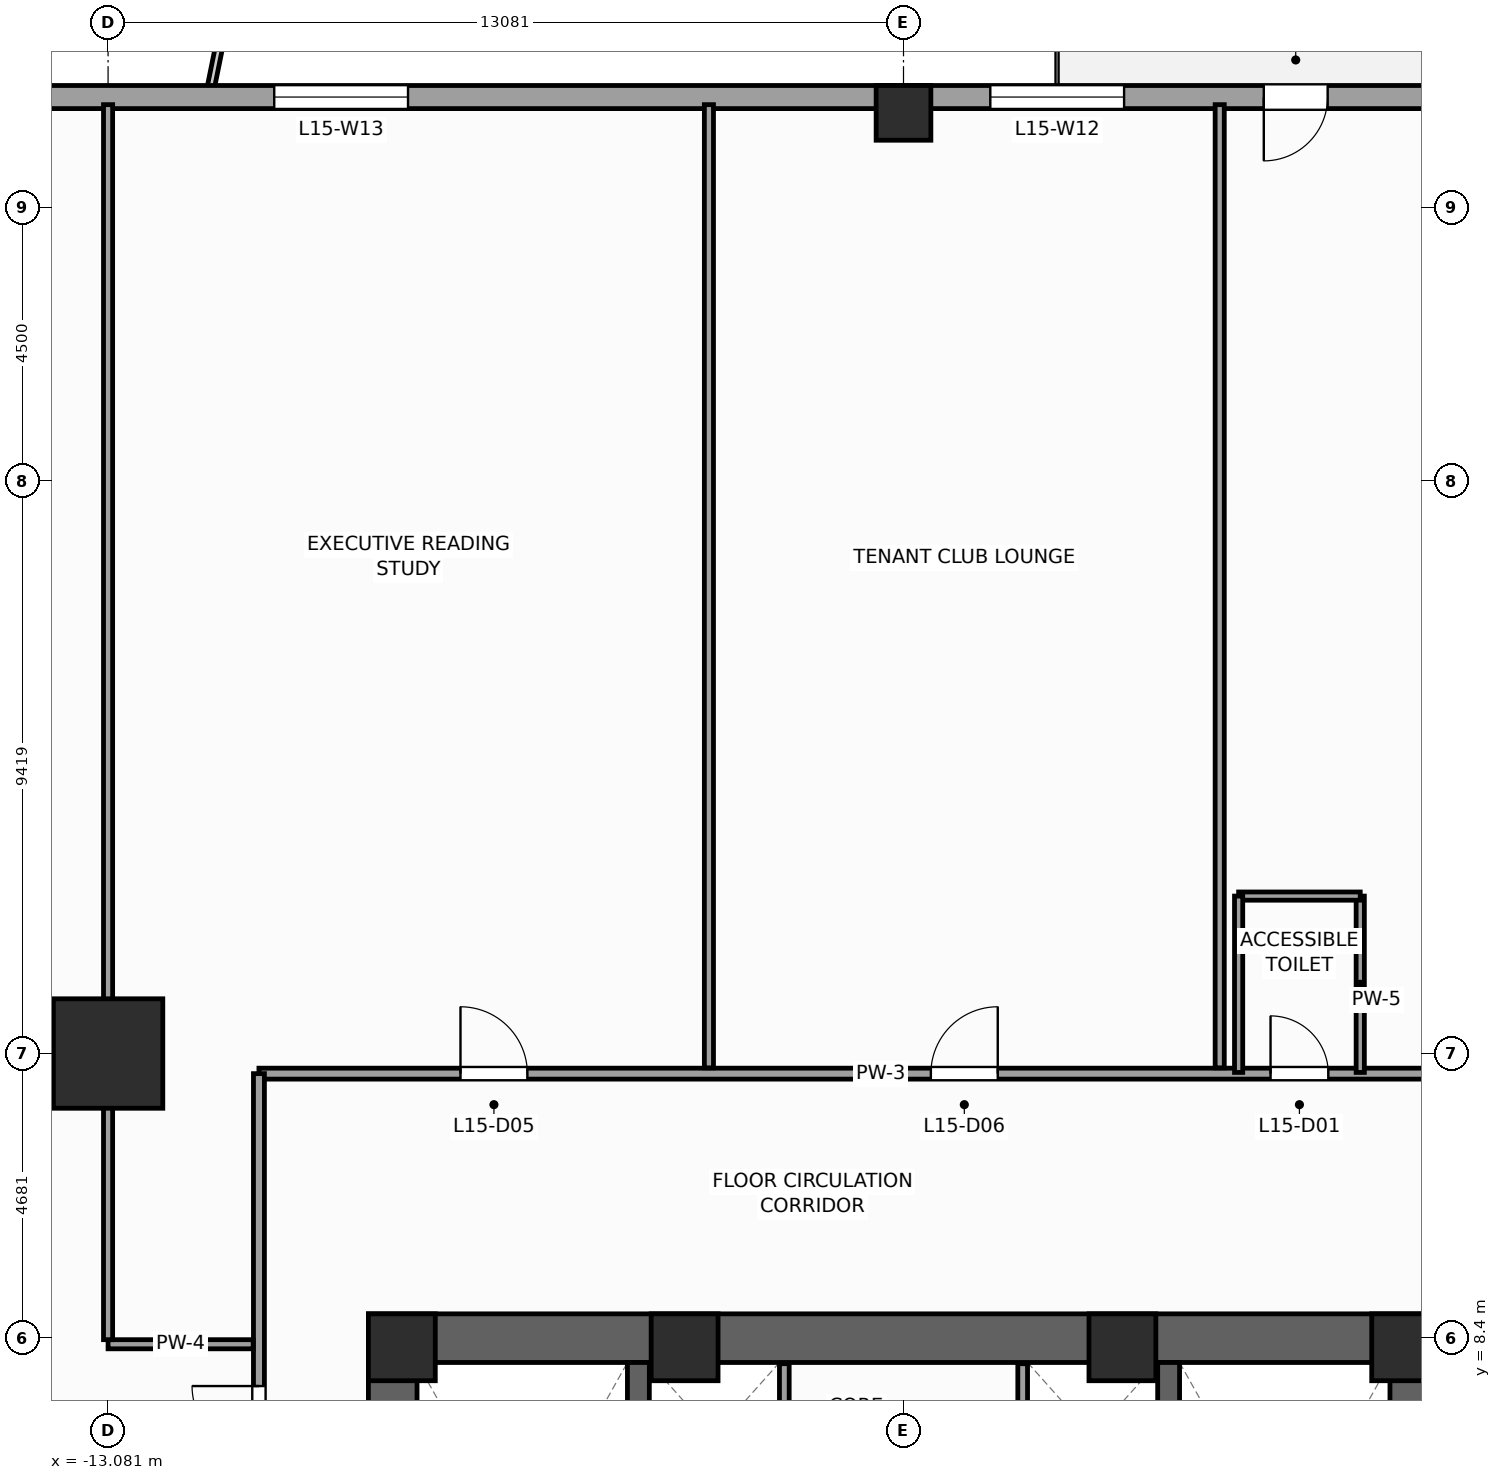
"""IFC4 building model, lengths in metres.
Left out: names, types, materials, properties, quantities, classifications, styles, units other than length and angle.
Written with IfcOpenShell. Run it as: python <this file> out.ifc"""

import sys

from ifc_helpers import new_model, si_unit, direction, frame, frame_2d, origin, origin_2d, place, context, subcontext, project, spatial, rectangle, extrude, source, transform, mapped, element, fill, save


model = new_model("IFC4")
c1 = context("Model", 3, precision=1e-05, world=origin(), true_north=direction((0.0, 1.0)))
c2 = subcontext(c1, "Body", "Model", "MODEL_VIEW")
j1 = project(units=[si_unit("LENGTHUNIT", "METRE"), si_unit("PLANEANGLEUNIT", "RADIAN")], contexts=[c1])
p1 = place(None, origin())
s1 = spatial("IfcSite", under=j1, at=p1, CompositionType="ELEMENT")
p2 = place(p1, origin())
s2 = spatial("IfcBuilding", under=s1, at=p2, CompositionType="ELEMENT")
p3 = place(p2, frame((0.0, 0.0, 66.0)))
s3 = spatial("IfcBuildingStorey", under=s2, at=p3, CompositionType="ELEMENT", Elevation=66.0)
p4 = place(p3, frame((-8.8, 8.4, 0.0), z_axis=(0.0, 0.0, 1.0), x_axis=(1.0, 0.0, 0.0)))
e1 = element("IfcWall", 1, at=p4, inside=s3, PredefinedType="SHEAR", context=c2, shape_type="SweptSolid", body=[
    extrude(rectangle(XDim=17.6, YDim=0.8, at=frame_2d((8.8, 0.0))), origin(), (0.0, 0.0, 1.0), 4.0),
])
p5 = place(p3, frame((-8.4, -8.0, 0.0), z_axis=(0.0, 0.0, 1.0), x_axis=(0.0, 1.0, 0.0)))
e2 = element("IfcWall", 2, at=p5, inside=s3, PredefinedType="SHEAR", context=c2, shape_type="SweptSolid", body=[
    extrude(rectangle(XDim=16.0, YDim=0.8, at=frame_2d((8.0, 0.0))), origin(), (0.0, 0.0, 1.0), 4.0),
])
p6 = place(p5, frame((4.69, 0.0, 0.0)))
e3 = element("IfcOpeningElement", 3, at=p6, cuts=e2, PredefinedType="OPENING", context=c2, shape_type="SweptSolid", body=[
    extrude(rectangle(XDim=1.3, YDim=2.2, at=frame_2d((0.65, 1.1))), frame((0.0, 0.41, 0.0), z_axis=(0.0, -1.0, 0.0), x_axis=(1.0, 0.0, 0.0)), (0.0, 0.0, 1.0), 0.82),
])
p7 = place(p3, frame((8.4, -8.0, 0.0), z_axis=(0.0, 0.0, 1.0), x_axis=(0.0, 1.0, 0.0)))
e4 = element("IfcWall", 4, at=p7, inside=s3, PredefinedType="SHEAR", context=c2, shape_type="SweptSolid", body=[
    extrude(rectangle(XDim=16.0, YDim=0.8, at=frame_2d((8.0, 0.0))), origin(), (0.0, 0.0, 1.0), 4.0),
])
p8 = place(p7, frame((4.69, 0.0, 0.0)))
e5 = element("IfcOpeningElement", 5, at=p8, cuts=e4, PredefinedType="OPENING", context=c2, shape_type="SweptSolid", body=[
    extrude(rectangle(XDim=1.3, YDim=2.2, at=frame_2d((0.65, 1.1))), frame((0.0, 0.41, 0.0), z_axis=(0.0, -1.0, 0.0), x_axis=(1.0, 0.0, 0.0)), (0.0, 0.0, 1.0), 0.82),
])
for number, where, z_axis, x_axis in (
    (6, (-4.36, -8.0, 0.0), (0.0, 0.0, 1.0), (0.0, 1.0, 0.0)),
    (7, (4.36, -8.0, 0.0), (0.0, 0.0, 1.0), (0.0, 1.0, 0.0)),
):
    element("IfcWall", number, at=place(p3, frame(where, z_axis=z_axis, x_axis=x_axis)), inside=s3, PredefinedType="SHEAR", context=c2, shape_type="SweptSolid", body=[
        extrude(rectangle(XDim=16.0, YDim=0.36, at=frame_2d((8.0, 0.0))), origin(), (0.0, 0.0, 1.0), 4.0),
    ])
m1 = source(origin(), c2, "Body", "SweptSolid", [
    extrude(rectangle(XDim=1.1, YDim=1.1, at=origin_2d()), origin(), (0.0, 0.0, 1.0), 4.0),
])
for number, where, z_axis, x_axis in (
    (8, (8.25, 8.25, 0.0), (0.0, 0.0, 1.0), (1.0, 0.0, 0.0)),
    (9, (-8.25, 8.25, 0.0), (0.0, 0.0, 1.0), (1.0, 0.0, 0.0)),
    (10, (-3.6, 8.25, 0.0), (0.0, 0.0, 1.0), (1.0, 0.0, 0.0)),
    (11, (3.6, 8.25, 0.0), (0.0, 0.0, 1.0), (1.0, 0.0, 0.0)),
):
    element("IfcColumn", number, at=place(p3, frame(where, z_axis=z_axis, x_axis=x_axis)), inside=s3, PredefinedType="PILASTER", context=c2, shape_type="MappedRepresentation", body=[
        mapped(m1, transform((0.0, 0.0, 0.0), scale=1.0)),
    ])
m2 = source(origin(), c2, "Body", "SweptSolid", [
    extrude(rectangle(XDim=1.8, YDim=1.8, at=origin_2d()), origin(), (0.0, 0.0, 1.0), 4.0),
])
p9 = place(p3, frame((-13.081, 13.081, 0.0), z_axis=(0.0, 0.0, 1.0), x_axis=(1.0, 0.0, 0.0)))
e12 = element("IfcColumn", 12, at=p9, inside=s3, PredefinedType="COLUMN", context=c2, shape_type="MappedRepresentation", body=[
    mapped(m2, transform((0.0, 0.0, 0.0), scale=1.0)),
])
m3 = source(origin(), c2, "Body", "SweptSolid", [
    extrude(rectangle(XDim=0.9, YDim=0.9, at=origin_2d()), origin(), (0.0, 0.0, 1.0), 4.0),
])
p10 = place(p3, frame((0.0, 28.55, 0.0), z_axis=(0.0, 0.0, 1.0), x_axis=(1.0, 0.0, 0.0)))
e13 = element("IfcColumn", 13, at=p10, inside=s3, PredefinedType="COLUMN", context=c2, shape_type="MappedRepresentation", body=[
    mapped(m3, transform((0.0, 0.0, 0.0), scale=1.0)),
])
p11 = place(p3, frame((25.69, 28.81, 0.0), z_axis=(0.0, 0.0, 1.0), x_axis=(-1.0, 0.0, 0.0)))
e14 = element("IfcWall", 14, at=p11, inside=s3, PredefinedType="STANDARD", context=c2, shape_type="SweptSolid", body=[
    extrude(rectangle(XDim=51.38, YDim=0.38, at=frame_2d((25.69, 0.0))), origin(), (0.0, 0.0, 1.0), 3.12),
])
p12 = place(p11, frame((18.715, 0.0, 0.0)))
e15 = element("IfcOpeningElement", 15, at=p12, cuts=e14, PredefinedType="OPENING", context=c2, shape_type="SweptSolid", body=[
    extrude(rectangle(XDim=1.05, YDim=2.25, at=frame_2d((0.525, 1.125))), frame((0.0, 0.2, 0.0), z_axis=(0.0, -1.0, 0.0), x_axis=(1.0, 0.0, 0.0)), (0.0, 0.0, 1.0), 0.4),
])
p13 = place(p11, frame((5.466, 0.0, 0.49)))
e16 = element("IfcOpeningElement", 16, at=p13, cuts=e14, PredefinedType="OPENING", context=c2, shape_type="SweptSolid", body=[
    extrude(rectangle(XDim=1.4, YDim=2.4, at=frame_2d((0.7, 1.2))), frame((0.0, 0.2, 0.0), z_axis=(0.0, -1.0, 0.0), x_axis=(1.0, 0.0, 0.0)), (0.0, 0.0, 1.0), 0.4),
])
p14 = place(p11, frame((13.8, 0.0, 0.49)))
e17 = element("IfcOpeningElement", 17, at=p14, cuts=e14, PredefinedType="OPENING", context=c2, shape_type="SweptSolid", body=[
    extrude(rectangle(XDim=2.2, YDim=2.4, at=frame_2d((1.1, 1.2))), frame((0.0, 0.2, 0.0), z_axis=(0.0, -1.0, 0.0), x_axis=(1.0, 0.0, 0.0)), (0.0, 0.0, 1.0), 0.4),
])
p15 = place(p11, frame((22.062, 0.0, 0.49)))
e18 = element("IfcOpeningElement", 18, at=p15, cuts=e14, PredefinedType="OPENING", context=c2, shape_type="SweptSolid", body=[
    extrude(rectangle(XDim=2.2, YDim=2.4, at=frame_2d((1.1, 1.2))), frame((0.0, 0.2, 0.0), z_axis=(0.0, -1.0, 0.0), x_axis=(1.0, 0.0, 0.0)), (0.0, 0.0, 1.0), 0.4),
])
p16 = place(p11, frame((33.838, 0.0, 0.49)))
e19 = element("IfcOpeningElement", 19, at=p16, cuts=e14, PredefinedType="OPENING", context=c2, shape_type="SweptSolid", body=[
    extrude(rectangle(XDim=2.2, YDim=2.4, at=frame_2d((1.1, 1.2))), frame((0.0, 0.2, 0.0), z_axis=(0.0, -1.0, 0.0), x_axis=(1.0, 0.0, 0.0)), (0.0, 0.0, 1.0), 0.4),
])
p17 = place(p11, frame((43.487, 0.0, 0.49)))
e20 = element("IfcOpeningElement", 20, at=p17, cuts=e14, PredefinedType="OPENING", context=c2, shape_type="SweptSolid", body=[
    extrude(rectangle(XDim=1.4, YDim=2.4, at=frame_2d((0.7, 1.2))), frame((0.0, 0.2, 0.0), z_axis=(0.0, -1.0, 0.0), x_axis=(1.0, 0.0, 0.0)), (0.0, 0.0, 1.0), 0.4),
])
for number, where, z_axis, x_axis in (
    (21, (-1.96, 4.58, 0.0), (0.0, 0.0, 1.0), (0.0, 1.0, 0.0)),
    (22, (1.96, 4.58, 0.0), (0.0, 0.0, 1.0), (0.0, 1.0, 0.0)),
):
    element("IfcWall", number, at=place(p3, frame(where, z_axis=z_axis, x_axis=x_axis)), inside=s3, PredefinedType="PARTITIONING", context=c2, shape_type="SweptSolid", body=[
        extrude(rectangle(XDim=3.4, YDim=0.16, at=frame_2d((1.7, 0.0))), origin(), (0.0, 0.0, 1.0), 3.72),
    ])
p18 = place(p3, frame((-10.6, 12.75, 0.0), z_axis=(0.0, 0.0, 1.0), x_axis=(1.0, 0.0, 0.0)))
e23 = element("IfcWall", 23, at=p18, inside=s3, PredefinedType="PARTITIONING", context=c2, shape_type="SweptSolid", body=[
    extrude(rectangle(XDim=21.2, YDim=0.18, at=frame_2d((10.6, 0.0))), origin(), (0.0, 0.0, 1.0), 3.72),
])
p19 = place(p18, frame((16.636, 0.0, 0.0)))
e24 = element("IfcOpeningElement", 24, at=p19, cuts=e23, PredefinedType="OPENING", context=c2, shape_type="SweptSolid", body=[
    extrude(rectangle(XDim=0.95, YDim=2.1, at=frame_2d((0.475, 1.05))), frame((0.0, 0.1, 0.0), z_axis=(0.0, -1.0, 0.0), x_axis=(1.0, 0.0, 0.0)), (0.0, 0.0, 1.0), 0.2),
])
p20 = place(p18, frame((3.314, 0.0, 0.0)))
e25 = element("IfcOpeningElement", 25, at=p20, cuts=e23, PredefinedType="OPENING", context=c2, shape_type="SweptSolid", body=[
    extrude(rectangle(XDim=1.1, YDim=2.2, at=frame_2d((0.55, 1.1))), frame((0.0, 0.1, 0.0), z_axis=(0.0, -1.0, 0.0), x_axis=(1.0, 0.0, 0.0)), (0.0, 0.0, 1.0), 0.2),
])
p21 = place(p18, frame((11.05, 0.0, 0.0)))
e26 = element("IfcOpeningElement", 26, at=p21, cuts=e23, PredefinedType="OPENING", context=c2, shape_type="SweptSolid", body=[
    extrude(rectangle(XDim=1.1, YDim=2.2, at=frame_2d((0.55, 1.1))), frame((0.0, 0.1, 0.0), z_axis=(0.0, -1.0, 0.0), x_axis=(1.0, 0.0, 0.0)), (0.0, 0.0, 1.0), 0.2),
])
p22 = place(p3, frame((-10.6, 3.35, 0.0), z_axis=(0.0, 0.0, 1.0), x_axis=(0.0, 1.0, 0.0)))
e27 = element("IfcWall", 27, at=p22, inside=s3, PredefinedType="PARTITIONING", context=c2, shape_type="SweptSolid", body=[
    extrude(rectangle(XDim=9.4, YDim=0.18, at=frame_2d((4.7, 0.0))), origin(), (0.0, 0.0, 1.0), 3.72),
])
p23 = place(p22, frame((3.163, 0.0, 0.0)))
e28 = element("IfcOpeningElement", 28, at=p23, cuts=e27, PredefinedType="OPENING", context=c2, shape_type="SweptSolid", body=[
    extrude(rectangle(XDim=1.1, YDim=2.2, at=frame_2d((0.55, 1.1))), frame((0.0, 0.1, 0.0), z_axis=(0.0, -1.0, 0.0), x_axis=(1.0, 0.0, 0.0)), (0.0, 0.0, 1.0), 0.2),
])
p24 = place(p3, frame((-10.695, 8.3, 0.0), z_axis=(0.0, 0.0, 1.0), x_axis=(-1.0, 0.0, 0.0)))
e29 = element("IfcWall", 29, at=p24, inside=s3, PredefinedType="PARTITIONING", context=c2, shape_type="SweptSolid", body=[
    extrude(rectangle(XDim=2.386, YDim=0.15, at=frame_2d((1.193, 0.0))), origin(), (0.0, 0.0, 1.0), 3.72),
])
p25 = place(p3, frame((-13.081, 8.375, 0.0), z_axis=(0.0, 0.0, 1.0), x_axis=(0.0, 1.0, 0.0)))
e30 = element("IfcWall", 30, at=p25, inside=s3, PredefinedType="PARTITIONING", context=c2, shape_type="SweptSolid", body=[
    extrude(rectangle(XDim=20.31, YDim=0.15, at=frame_2d((10.155, 0.0))), origin(), (0.0, 0.0, 1.0), 2.712),
])
for number, where, z_axis, x_axis in (
    (31, (-3.2, 12.845, 0.0), (0.0, 0.0, 1.0), (0.0, 1.0, 0.0)),
    (32, (5.2, 12.845, 0.0), (0.0, 0.0, 1.0), (0.0, 1.0, 0.0)),
):
    element("IfcWall", number, at=place(p3, frame(where, z_axis=z_axis, x_axis=x_axis)), inside=s3, PredefinedType="PARTITIONING", context=c2, shape_type="SweptSolid", body=[
        extrude(rectangle(XDim=15.84, YDim=0.15, at=frame_2d((7.92, 0.0))), origin(), (0.0, 0.0, 1.0), 3.72),
    ])
p26 = place(p3, frame((7.511, 12.77, 0.0), z_axis=(0.0, 0.0, 1.0), x_axis=(0.0, 1.0, 0.0)))
e33 = element("IfcWall", 33, at=p26, inside=s3, PredefinedType="PARTITIONING", context=c2, shape_type="SweptSolid", body=[
    extrude(rectangle(XDim=2.9, YDim=0.135, at=frame_2d((1.45, 0.0))), origin(), (0.0, 0.0, 1.0), 3.72),
])
p27 = place(p3, frame((5.511, 15.67, 0.0), z_axis=(0.0, 0.0, 1.0), x_axis=(1.0, 0.0, 0.0)))
e34 = element("IfcWall", 34, at=p27, inside=s3, PredefinedType="PARTITIONING", context=c2, shape_type="SweptSolid", body=[
    extrude(rectangle(XDim=2.0, YDim=0.135, at=frame_2d((1.0, 0.0))), origin(), (0.0, 0.0, 1.0), 3.22),
])
p28 = place(p3, frame((5.511, 12.77, 0.0), z_axis=(0.0, 0.0, 1.0), x_axis=(0.0, 1.0, 0.0)))
e35 = element("IfcWall", 35, at=p28, inside=s3, PredefinedType="PARTITIONING", context=c2, shape_type="SweptSolid", body=[
    extrude(rectangle(XDim=2.9, YDim=0.135, at=frame_2d((1.45, 0.0))), origin(), (0.0, 0.0, 1.0), 3.72),
])
m4 = source(origin(), c2, "Body", "SweptSolid", [
    extrude(rectangle(XDim=1.05, YDim=2.25, at=frame_2d((0.525, 1.125))), frame((0.0, 0.025, 0.0), z_axis=(0.0, -1.0, 0.0), x_axis=(1.0, 0.0, 0.0)), (0.0, 0.0, 1.0), 0.05),
])
p29 = place(p12, origin())
e36 = element("IfcDoor", 36, at=p29, inside=s3, OperationType="SINGLE_SWING_RIGHT", PredefinedType="DOOR", context=c2, shape_type="MappedRepresentation", body=[
    mapped(m4, transform((0.0, 0.0, 0.0), scale=1.0)),
])
fill(e15, e36)
m5 = source(origin(), c2, "Body", "SweptSolid", [
    extrude(rectangle(XDim=2.2, YDim=2.4, at=frame_2d((1.1, 1.2))), frame((0.0, 0.03, 0.0), z_axis=(0.0, -1.0, 0.0), x_axis=(1.0, 0.0, 0.0)), (0.0, 0.0, 1.0), 0.06),
])
p30 = place(p15, origin())
e37 = element("IfcWindow", 37, at=p30, inside=s3, PartitioningType="SINGLE_PANEL", PredefinedType="WINDOW", context=c2, shape_type="MappedRepresentation", body=[
    mapped(m5, transform((0.0, 0.0, 0.0), scale=1.0)),
])
fill(e18, e37)
p31 = place(p16, origin())
e38 = element("IfcWindow", 38, at=p31, inside=s3, PartitioningType="SINGLE_PANEL", PredefinedType="WINDOW", context=c2, shape_type="MappedRepresentation", body=[
    mapped(m5, transform((0.0, 0.0, 0.0), scale=1.0)),
])
fill(e19, e38)
m6 = source(origin(), c2, "Body", "SweptSolid", [
    extrude(rectangle(XDim=0.95, YDim=2.1, at=frame_2d((0.475, 1.05))), frame((0.0, 0.025, 0.0), z_axis=(0.0, -1.0, 0.0), x_axis=(1.0, 0.0, 0.0)), (0.0, 0.0, 1.0), 0.05),
])
p32 = place(p19, origin())
e39 = element("IfcDoor", 39, at=p32, inside=s3, OperationType="SINGLE_SWING_LEFT", PredefinedType="DOOR", context=c2, shape_type="MappedRepresentation", body=[
    mapped(m6, transform((0.0, 0.0, 0.0), scale=1.0)),
])
fill(e24, e39)
m7 = source(origin(), c2, "Body", "SweptSolid", [
    extrude(rectangle(XDim=1.1, YDim=2.2, at=frame_2d((0.55, 1.1))), frame((0.0, 0.025, 0.0), z_axis=(0.0, -1.0, 0.0), x_axis=(1.0, 0.0, 0.0)), (0.0, 0.0, 1.0), 0.05),
])
p33 = place(p23, origin())
e40 = element("IfcDoor", 40, at=p33, inside=s3, OperationType="SINGLE_SWING_RIGHT", PredefinedType="DOOR", context=c2, shape_type="MappedRepresentation", body=[
    mapped(m7, transform((0.0, 0.0, 0.0), scale=1.0)),
])
fill(e28, e40)
p34 = place(p20, origin())
e41 = element("IfcDoor", 41, at=p34, inside=s3, OperationType="SINGLE_SWING_LEFT", PredefinedType="DOOR", context=c2, shape_type="MappedRepresentation", body=[
    mapped(m7, transform((0.0, 0.0, 0.0), scale=1.0)),
])
fill(e25, e41)
p35 = place(p21, origin())
e42 = element("IfcDoor", 42, at=p35, inside=s3, OperationType="SINGLE_SWING_RIGHT", PredefinedType="DOOR", context=c2, shape_type="MappedRepresentation", body=[
    mapped(m7, transform((0.0, 0.0, 0.0), scale=1.0)),
])
fill(e26, e42)
save(model, sys.argv[1])
